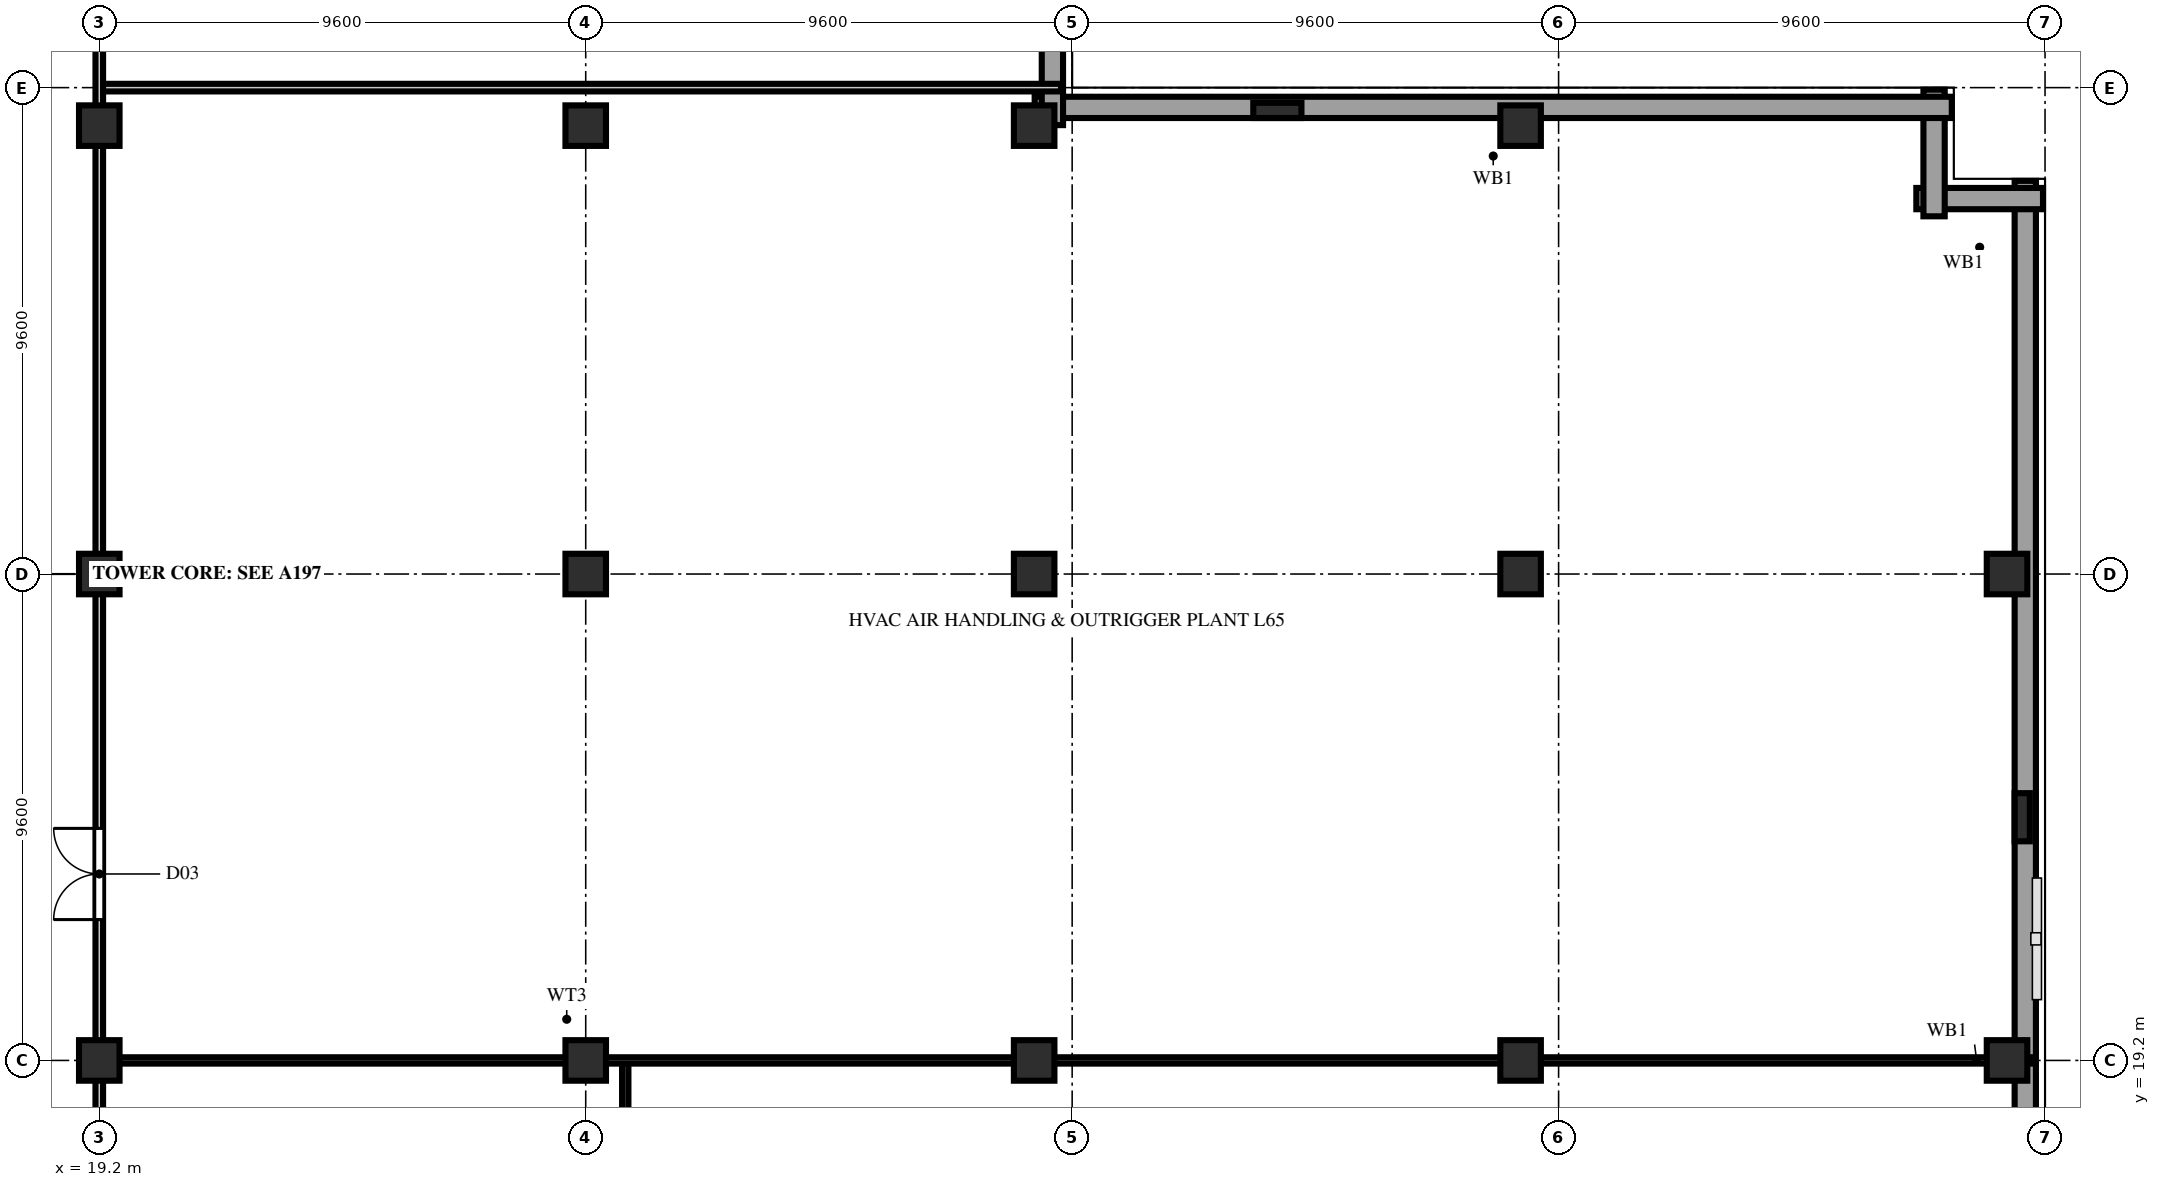
"""IFC4 building model, lengths in metres.
Left out: names, types, materials, properties, quantities, classifications, styles, units other than length and angle.
Written with IfcOpenShell. Run it as: python <this file> out.ifc"""

import sys

from ifc_helpers import new_model, si_unit, direction, frame, frame_2d, origin, origin_2d, place, context, subcontext, project, spatial, rectangle, extrude, element, fill, save


model = new_model("IFC4")
c1 = context("Model", 3, precision=1e-05, world=origin(), true_north=direction((0.0, 1.0)))
c2 = subcontext(c1, "Body", "Model", "MODEL_VIEW")
j1 = project(units=[si_unit("LENGTHUNIT", "METRE"), si_unit("PLANEANGLEUNIT", "RADIAN")], contexts=[c1])
p1 = place(None, origin())
s1 = spatial("IfcSite", under=j1, at=p1, CompositionType="ELEMENT")
p2 = place(p1, origin())
s2 = spatial("IfcBuilding", under=s1, at=p2, CompositionType="ELEMENT")
p3 = place(p2, frame((0.0, 0.0, 256.0)))
s3 = spatial("IfcBuildingStorey", under=s2, at=p3, CompositionType="ELEMENT", Elevation=256.0)
for number, where, z_axis, x_axis in (
    (1, (19.2, 19.2, 0.0), (0.0, 0.0, 1.0), (1.0, 0.0, 0.0)),
    (2, (19.2, 28.8, 0.0), (0.0, 0.0, 1.0), (1.0, 0.0, 0.0)),
    (3, (19.2, 37.65, 0.0), (0.0, 0.0, 1.0), (1.0, 0.0, 0.0)),
    (4, (28.8, 19.2, 0.0), (0.0, 0.0, 1.0), (1.0, 0.0, 0.0)),
    (5, (28.8, 28.8, 0.0), (0.0, 0.0, 1.0), (1.0, 0.0, 0.0)),
    (6, (28.8, 37.65, 0.0), (0.0, 0.0, 1.0), (1.0, 0.0, 0.0)),
    (7, (37.65, 19.2, 0.0), (0.0, 0.0, 1.0), (1.0, 0.0, 0.0)),
    (8, (37.65, 28.8, 0.0), (0.0, 0.0, 1.0), (1.0, 0.0, 0.0)),
    (9, (37.65, 37.65, 0.0), (0.0, 0.0, 1.0), (1.0, 0.0, 0.0)),
    (10, (47.25, 19.2, 0.0), (0.0, 0.0, 1.0), (1.0, 0.0, 0.0)),
    (11, (47.25, 28.8, 0.0), (0.0, 0.0, 1.0), (1.0, 0.0, 0.0)),
    (12, (47.25, 37.65, 0.0), (0.0, 0.0, 1.0), (1.0, 0.0, 0.0)),
):
    element("IfcColumn", number, at=place(p3, frame(where, z_axis=z_axis, x_axis=x_axis)), inside=s3, PredefinedType="COLUMN", context=c2, shape_type="SweptSolid", body=[
        extrude(rectangle(XDim=0.8, YDim=0.8, at=origin_2d()), origin(), (0.0, 0.0, 1.0), 5.0),
    ])
for number, where, z_axis, x_axis in (
    (13, (56.85, 19.2, 0.0), (0.0, 0.0, 1.0), (1.0, 0.0, 0.0)),
    (14, (56.85, 28.8, 0.0), (0.0, 0.0, 1.0), (1.0, 0.0, 0.0)),
):
    element("IfcColumn", number, at=place(p3, frame(where, z_axis=z_axis, x_axis=x_axis)), inside=s3, PredefinedType="COLUMN", context=c2, shape_type="SweptSolid", body=[
        extrude(rectangle(XDim=0.8, YDim=0.8, at=origin_2d()), origin(), (0.0, 0.0, 1.0), 4.7),
    ])
p4 = place(p3, frame((57.15, 24.0, 0.0), z_axis=(0.0, 0.0, 1.0), x_axis=(0.0, 1.0, 0.0)))
e15 = element("IfcColumn", 15, at=p4, inside=s3, PredefinedType="PILASTER", context=c2, shape_type="SweptSolid", body=[
    extrude(rectangle(XDim=0.95, YDim=0.3, at=origin_2d()), origin(), (0.0, 0.0, 1.0), 4.7),
])
p5 = place(p3, frame((42.45, 37.95, 0.0), z_axis=(0.0, 0.0, 1.0), x_axis=(1.0, 0.0, 0.0)))
e16 = element("IfcColumn", 16, at=p5, inside=s3, PredefinedType="PILASTER", context=c2, shape_type="SweptSolid", body=[
    extrude(rectangle(XDim=0.95, YDim=0.3, at=origin_2d()), origin(), (0.0, 0.0, 1.0), 5.0),
])
p6 = place(p3, frame((57.21, 1.84, 0.0), z_axis=(0.0, 0.0, 1.0), x_axis=(0.0, 1.0, 0.0)))
e17 = element("IfcWall", 17, at=p6, inside=s3, PredefinedType="SOLIDWALL", context=c2, shape_type="SweptSolid", body=[
    extrude(rectangle(XDim=34.72, YDim=0.42, at=frame_2d((17.36, 0.0))), origin(), (0.0, 0.0, 1.0), 4.7),
])
for number, where, z_axis, x_axis in (
    (18, (57.56, 36.21, 0.0), (0.0, 0.0, 1.0), (-1.0, 0.0, 0.0)),
    (19, (55.41, 35.86, 0.0), (0.0, 0.0, 1.0), (0.0, 1.0, 0.0)),
):
    element("IfcWall", number, at=place(p3, frame(where, z_axis=z_axis, x_axis=x_axis)), inside=s3, PredefinedType="SOLIDWALL", context=c2, shape_type="SweptSolid", body=[
        extrude(rectangle(XDim=2.5, YDim=0.42, at=frame_2d((1.25, 0.0))), origin(), (0.0, 0.0, 1.0), 4.7),
    ])
p7 = place(p3, frame((55.76, 38.01, 0.0), z_axis=(0.0, 0.0, 1.0), x_axis=(-1.0, 0.0, 0.0)))
e20 = element("IfcWall", 20, at=p7, inside=s3, PredefinedType="SOLIDWALL", context=c2, shape_type="SweptSolid", body=[
    extrude(rectangle(XDim=18.1, YDim=0.42, at=frame_2d((9.05, 0.0))), origin(), (0.0, 0.0, 1.0), 4.74),
])
p8 = place(p3, frame((38.01, 37.66, 0.0), z_axis=(0.0, 0.0, 1.0), x_axis=(0.0, 1.0, 0.0)))
e21 = element("IfcWall", 21, at=p8, inside=s3, PredefinedType="SOLIDWALL", context=c2, shape_type="SweptSolid", body=[
    extrude(rectangle(XDim=9.59, YDim=0.42, at=frame_2d((4.795, 0.0))), origin(), (0.0, 0.0, 1.0), 3.34),
])
p9 = place(p3, frame((29.58, 17.95, 0.0), z_axis=(0.0, 0.0, 1.0), x_axis=(0.0, 1.0, 0.0)))
e22 = element("IfcWall", 22, at=p9, inside=s3, PredefinedType="PARTITIONING", context=c2, shape_type="SweptSolid", body=[
    extrude(rectangle(XDim=1.25, YDim=0.125, at=frame_2d((0.625, 0.0))), origin(), (0.0, 0.0, 1.0), 4.74),
])
p10 = place(p3, frame((19.2, 19.2, 0.0), z_axis=(0.0, 0.0, 1.0), x_axis=(1.0, 0.0, 0.0)))
e23 = element("IfcWall", 23, at=p10, inside=s3, PredefinedType="PARTITIONING", context=c2, shape_type="SweptSolid", body=[
    extrude(rectangle(XDim=18.45, YDim=0.125, at=frame_2d((9.225, 0.0))), origin(), (0.0, 0.0, 1.0), 2.323),
])
p11 = place(p3, frame((37.65, 19.2, 0.0), z_axis=(0.0, 0.0, 1.0), x_axis=(1.0, 0.0, 0.0)))
e24 = element("IfcWall", 24, at=p11, inside=s3, PredefinedType="PARTITIONING", context=c2, shape_type="SweptSolid", body=[
    extrude(rectangle(XDim=9.6, YDim=0.125, at=frame_2d((4.8, 0.0))), origin(), (0.0, 0.0, 1.0), 3.967),
])
p12 = place(p3, frame((47.25, 19.2, 0.0), z_axis=(0.0, 0.0, 1.0), x_axis=(1.0, 0.0, 0.0)))
e25 = element("IfcWall", 25, at=p12, inside=s3, PredefinedType="PARTITIONING", context=c2, shape_type="SweptSolid", body=[
    extrude(rectangle(XDim=9.6, YDim=0.125, at=frame_2d((4.8, 0.0))), origin(), (0.0, 0.0, 1.0), 3.927),
])
p13 = place(p3, frame((56.85, 19.2, 0.0), z_axis=(0.0, 0.0, 1.0), x_axis=(1.0, 0.0, 0.0)))
e26 = element("IfcWall", 26, at=p13, inside=s3, PredefinedType="PARTITIONING", context=c2, shape_type="SweptSolid", body=[
    extrude(rectangle(XDim=0.53, YDim=0.125, at=frame_2d((0.265, 0.0))), origin(), (0.0, 0.0, 1.0), 4.74),
])
p14 = place(p3, frame((19.2, 38.4, 0.0), z_axis=(0.0, 0.0, 1.0), x_axis=(1.0, 0.0, 0.0)))
e27 = element("IfcWall", 27, at=p14, inside=s3, PredefinedType="PARTITIONING", context=c2, shape_type="SweptSolid", body=[
    extrude(rectangle(XDim=18.98, YDim=0.15, at=frame_2d((9.49, 0.0))), origin(), (0.0, 0.0, 1.0), 4.74),
])
p15 = place(p3, frame((19.2, 9.98, 0.0), z_axis=(0.0, 0.0, 1.0), x_axis=(0.0, 1.0, 0.0)))
e28 = element("IfcWall", 28, at=p15, inside=s3, PredefinedType="PARTITIONING", context=c2, shape_type="SweptSolid", body=[
    extrude(rectangle(XDim=37.27, YDim=0.15, at=frame_2d((18.635, 0.0))), origin(), (0.0, 0.0, 1.0), 3.967),
])
p16 = place(p15, frame((2.0, 0.0, 0.0)))
e29 = element("IfcOpeningElement", 29, at=p16, cuts=e28, PredefinedType="OPENING", context=c2, shape_type="SweptSolid", body=[
    extrude(rectangle(XDim=1.8, YDim=2.2, at=frame_2d((0.9, 1.1))), frame((0.0, 0.087, 0.0), z_axis=(0.0, -1.0, 0.0), x_axis=(1.0, 0.0, 0.0)), (0.0, 0.0, 1.0), 0.174),
])
p17 = place(p15, frame((12.0, 0.0, 0.0)))
e30 = element("IfcOpeningElement", 30, at=p17, cuts=e28, PredefinedType="OPENING", context=c2, shape_type="SweptSolid", body=[
    extrude(rectangle(XDim=1.8, YDim=2.2, at=frame_2d((0.9, 1.1))), frame((0.0, 0.087, 0.0), z_axis=(0.0, -1.0, 0.0), x_axis=(1.0, 0.0, 0.0)), (0.0, 0.0, 1.0), 0.174),
])
p18 = place(p15, frame((30.5, 0.0, 0.0)))
e31 = element("IfcOpeningElement", 31, at=p18, cuts=e28, PredefinedType="OPENING", context=c2, shape_type="SweptSolid", body=[
    extrude(rectangle(XDim=1.2, YDim=2.2, at=frame_2d((0.6, 1.1))), frame((0.0, 0.087, 0.0), z_axis=(0.0, -1.0, 0.0), x_axis=(1.0, 0.0, 0.0)), (0.0, 0.0, 1.0), 0.174),
])
p19 = place(p17, origin())
e32 = element("IfcDoor", 32, at=p19, inside=s3, OperationType="DOUBLE_DOOR_SINGLE_SWING", PredefinedType="DOOR", context=c2, shape_type="SweptSolid", body=[
    extrude(rectangle(XDim=1.8, YDim=2.2, at=frame_2d((0.9, 1.1))), frame((0.0, 0.025, 0.0), z_axis=(0.0, -1.0, 0.0), x_axis=(1.0, 0.0, 0.0)), (0.0, 0.0, 1.0), 0.05),
])
fill(e30, e32)
save(model, sys.argv[1])
